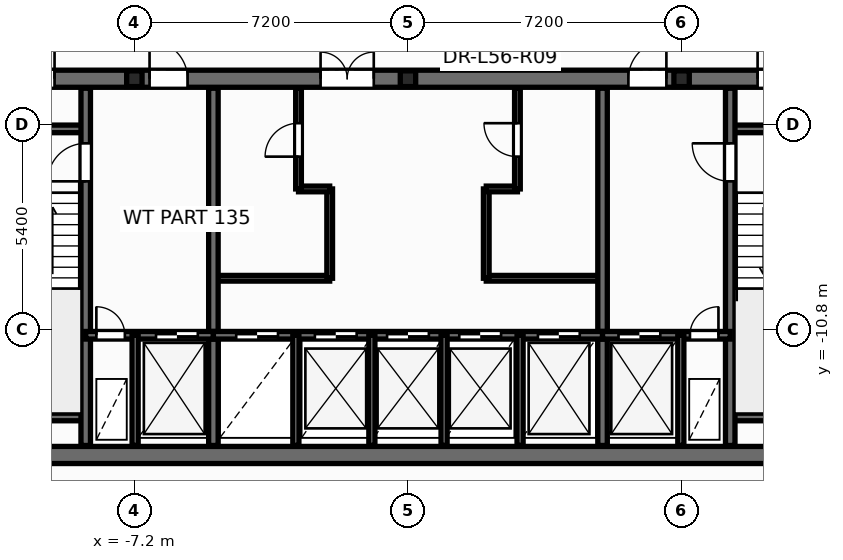
"""IFC4 building model, lengths in metres.
Left out: names, types, materials, properties, quantities, classifications, styles, units other than length and angle.
Written with IfcOpenShell. Run it as: python <this file> out.ifc"""

import sys

from ifc_helpers import new_model, si_unit, direction, frame, frame_2d, origin, origin_2d, place, context, subcontext, project, spatial, rectangle, i_section, extrude, element, fill, save


model = new_model("IFC4")
c1 = context("Model", 3, precision=1e-05, world=origin(), true_north=direction((0.0, 1.0)))
c2 = subcontext(c1, "Body", "Model", "MODEL_VIEW")
j1 = project(units=[si_unit("LENGTHUNIT", "METRE"), si_unit("PLANEANGLEUNIT", "RADIAN")], contexts=[c1])
p1 = place(None, origin())
s1 = spatial("IfcSite", under=j1, at=p1, CompositionType="ELEMENT")
p2 = place(p1, origin())
s2 = spatial("IfcBuilding", under=s1, at=p2, CompositionType="ELEMENT")
p3 = place(p2, frame((0.0, 0.0, 214.5)))
s3 = spatial("IfcBuildingStorey", under=s2, at=p3, CompositionType="ELEMENT", Elevation=214.5)
for number, where, z_axis, x_axis in (
    (1, (-7.2, -4.2, 0.0), (0.0, 0.0, 1.0), (1.0, 0.0, 0.0)),
    (2, (0.0, -4.2, 0.0), (0.0, 0.0, 1.0), (1.0, 0.0, 0.0)),
    (3, (7.2, -4.2, 0.0), (0.0, 0.0, 1.0), (1.0, 0.0, 0.0)),
):
    element("IfcColumn", number, at=place(p3, frame(where, z_axis=z_axis, x_axis=x_axis)), inside=s3, PredefinedType="PILASTER", context=c2, shape_type="SweptSolid", body=[
        extrude(i_section(OverallWidth=0.405, OverallDepth=0.414, WebThickness=0.022, FlangeThickness=0.032, at=origin_2d()), origin(), (0.0, 0.0, 1.0), 3.6),
    ])
p4 = place(p3, frame((-5.12, -9.45, 0.0), z_axis=(0.0, 0.0, 1.0), x_axis=(1.0, 0.0, 0.0)))
e4 = element("IfcWall", 4, at=p4, inside=s3, PredefinedType="PARTITIONING", context=c2, shape_type="SweptSolid", body=[
    extrude(rectangle(XDim=3.06, YDim=0.15, at=frame_2d((1.53, 0.0))), origin(), (0.0, 0.0, 1.0), 3.345),
])
p5 = place(p3, frame((-2.06, -9.45, 0.0), z_axis=(0.0, 0.0, 1.0), x_axis=(0.0, 1.0, 0.0)))
e5 = element("IfcWall", 5, at=p5, inside=s3, PredefinedType="PARTITIONING", context=c2, shape_type="SweptSolid", body=[
    extrude(rectangle(XDim=2.35, YDim=0.15, at=frame_2d((1.175, 0.0))), origin(), (0.0, 0.0, 1.0), 3.345),
])
p6 = place(p3, frame((-2.88, -7.1, 0.0), z_axis=(0.0, 0.0, 1.0), x_axis=(1.0, 0.0, 0.0)))
e6 = element("IfcWall", 6, at=p6, inside=s3, PredefinedType="PARTITIONING", context=c2, shape_type="SweptSolid", body=[
    extrude(rectangle(XDim=0.82, YDim=0.15, at=frame_2d((0.41, 0.0))), origin(), (0.0, 0.0, 1.0), 3.345),
])
p7 = place(p3, frame((-2.88, -7.1, 0.0), z_axis=(0.0, 0.0, 1.0), x_axis=(0.0, 1.0, 0.0)))
e7 = element("IfcWall", 7, at=p7, inside=s3, PredefinedType="PARTITIONING", context=c2, shape_type="SweptSolid", body=[
    extrude(rectangle(XDim=2.65, YDim=0.15, at=frame_2d((1.325, 0.0))), origin(), (0.0, 0.0, 1.0), 3.345),
])
p8 = place(p7, frame((0.85, 0.0, 0.0)))
e8 = element("IfcOpeningElement", 8, at=p8, cuts=e7, PredefinedType="OPENING", context=c2, shape_type="SweptSolid", body=[
    extrude(rectangle(XDim=0.886, YDim=2.104, at=frame_2d((0.44, 1.052))), frame((0.0, 0.085, 0.0), z_axis=(0.0, -1.0, 0.0), x_axis=(1.0, 0.0, 0.0)), (0.0, 0.0, 1.0), 0.17),
])
p9 = place(p3, frame((2.06, -9.45, 0.0), z_axis=(0.0, 0.0, 1.0), x_axis=(1.0, 0.0, 0.0)))
e9 = element("IfcWall", 9, at=p9, inside=s3, PredefinedType="PARTITIONING", context=c2, shape_type="SweptSolid", body=[
    extrude(rectangle(XDim=3.06, YDim=0.15, at=frame_2d((1.53, 0.0))), origin(), (0.0, 0.0, 1.0), 3.345),
])
p10 = place(p3, frame((2.06, -9.45, 0.0), z_axis=(0.0, 0.0, 1.0), x_axis=(0.0, 1.0, 0.0)))
e10 = element("IfcWall", 10, at=p10, inside=s3, PredefinedType="PARTITIONING", context=c2, shape_type="SweptSolid", body=[
    extrude(rectangle(XDim=2.35, YDim=0.15, at=frame_2d((1.175, 0.0))), origin(), (0.0, 0.0, 1.0), 3.345),
])
p11 = place(p3, frame((2.06, -7.1, 0.0), z_axis=(0.0, 0.0, 1.0), x_axis=(1.0, 0.0, 0.0)))
e11 = element("IfcWall", 11, at=p11, inside=s3, PredefinedType="PARTITIONING", context=c2, shape_type="SweptSolid", body=[
    extrude(rectangle(XDim=0.82, YDim=0.15, at=frame_2d((0.41, 0.0))), origin(), (0.0, 0.0, 1.0), 3.345),
])
p12 = place(p3, frame((2.88, -7.1, 0.0), z_axis=(0.0, 0.0, 1.0), x_axis=(0.0, 1.0, 0.0)))
e12 = element("IfcWall", 12, at=p12, inside=s3, PredefinedType="PARTITIONING", context=c2, shape_type="SweptSolid", body=[
    extrude(rectangle(XDim=2.65, YDim=0.15, at=frame_2d((1.325, 0.0))), origin(), (0.0, 0.0, 1.0), 3.345),
])
p13 = place(p12, frame((0.85, 0.0, 0.0)))
e13 = element("IfcOpeningElement", 13, at=p13, cuts=e12, PredefinedType="OPENING", context=c2, shape_type="SweptSolid", body=[
    extrude(rectangle(XDim=0.886, YDim=2.104, at=frame_2d((0.44, 1.052))), frame((0.0, 0.085, 0.0), z_axis=(0.0, -1.0, 0.0), x_axis=(1.0, 0.0, 0.0)), (0.0, 0.0, 1.0), 0.17),
])
p14 = place(p3, frame((-12.65, -14.1, 0.0), z_axis=(0.0, 0.0, 1.0), x_axis=(1.0, 0.0, 0.0)))
e14 = element("IfcWall", 14, at=p14, inside=s3, PredefinedType="SHEAR", context=c2, shape_type="SweptSolid", body=[
    extrude(rectangle(XDim=25.3, YDim=0.45, at=frame_2d((12.65, 0.0))), origin(), (0.0, 0.0, 1.0), 3.6),
])
p15 = place(p3, frame((-12.65, -4.2, 0.0), z_axis=(0.0, 0.0, 1.0), x_axis=(1.0, 0.0, 0.0)))
e15 = element("IfcWall", 15, at=p15, inside=s3, PredefinedType="SHEAR", context=c2, shape_type="SweptSolid", body=[
    extrude(rectangle(XDim=25.3, YDim=0.45, at=frame_2d((12.65, 0.0))), origin(), (0.0, 0.0, 1.0), 3.6),
])
p16 = place(p15, frame((0.95, 0.0, 0.0)))
e16 = element("IfcOpeningElement", 16, at=p16, cuts=e15, PredefinedType="OPENING", context=c2, shape_type="SweptSolid", body=[
    extrude(rectangle(XDim=0.756, YDim=2.054, at=frame_2d((0.375, 1.027))), frame((0.0, 0.235, 0.0), z_axis=(0.0, -1.0, 0.0), x_axis=(1.0, 0.0, 0.0)), (0.0, 0.0, 1.0), 0.47),
])
p17 = place(p15, frame((2.6, 0.0, 0.0)))
e17 = element("IfcOpeningElement", 17, at=p17, cuts=e15, PredefinedType="OPENING", context=c2, shape_type="SweptSolid", body=[
    extrude(rectangle(XDim=0.756, YDim=2.054, at=frame_2d((0.375, 1.027))), frame((0.0, 0.235, 0.0), z_axis=(0.0, -1.0, 0.0), x_axis=(1.0, 0.0, 0.0)), (0.0, 0.0, 1.0), 0.47),
])
p18 = place(p15, frame((21.85, 0.0, 0.0)))
e18 = element("IfcOpeningElement", 18, at=p18, cuts=e15, PredefinedType="OPENING", context=c2, shape_type="SweptSolid", body=[
    extrude(rectangle(XDim=0.756, YDim=2.054, at=frame_2d((0.375, 1.027))), frame((0.0, 0.235, 0.0), z_axis=(0.0, -1.0, 0.0), x_axis=(1.0, 0.0, 0.0)), (0.0, 0.0, 1.0), 0.47),
])
p19 = place(p15, frame((23.5, 0.0, 0.0)))
e19 = element("IfcOpeningElement", 19, at=p19, cuts=e15, PredefinedType="OPENING", context=c2, shape_type="SweptSolid", body=[
    extrude(rectangle(XDim=0.756, YDim=2.054, at=frame_2d((0.375, 1.027))), frame((0.0, 0.235, 0.0), z_axis=(0.0, -1.0, 0.0), x_axis=(1.0, 0.0, 0.0)), (0.0, 0.0, 1.0), 0.47),
])
p20 = place(p15, frame((5.85, 0.0, 0.0)))
e20 = element("IfcOpeningElement", 20, at=p20, cuts=e15, PredefinedType="OPENING", context=c2, shape_type="SweptSolid", body=[
    extrude(rectangle(XDim=1.006, YDim=2.104, at=frame_2d((0.5, 1.052))), frame((0.0, 0.235, 0.0), z_axis=(0.0, -1.0, 0.0), x_axis=(1.0, 0.0, 0.0)), (0.0, 0.0, 1.0), 0.47),
])
p21 = place(p15, frame((10.35, 0.0, 0.0)))
e21 = element("IfcOpeningElement", 21, at=p21, cuts=e15, PredefinedType="OPENING", context=c2, shape_type="SweptSolid", body=[
    extrude(rectangle(XDim=1.406, YDim=2.154, at=frame_2d((0.7, 1.077))), frame((0.0, 0.235, 0.0), z_axis=(0.0, -1.0, 0.0), x_axis=(1.0, 0.0, 0.0)), (0.0, 0.0, 1.0), 0.47),
])
p22 = place(p15, frame((18.45, 0.0, 0.0)))
e22 = element("IfcOpeningElement", 22, at=p22, cuts=e15, PredefinedType="OPENING", context=c2, shape_type="SweptSolid", body=[
    extrude(rectangle(XDim=1.006, YDim=2.104, at=frame_2d((0.5, 1.052))), frame((0.0, 0.235, 0.0), z_axis=(0.0, -1.0, 0.0), x_axis=(1.0, 0.0, 0.0)), (0.0, 0.0, 1.0), 0.47),
])
for number, where, z_axis, x_axis in (
    (23, (-12.35, -5.52, 0.0), (0.0, 0.0, 1.0), (1.0, 0.0, 0.0)),
    (24, (-12.35, -13.1, 0.0), (0.0, 0.0, 1.0), (1.0, 0.0, 0.0)),
    (25, (8.48, -5.52, 0.0), (0.0, 0.0, 1.0), (1.0, 0.0, 0.0)),
    (26, (8.48, -13.1, 0.0), (0.0, 0.0, 1.0), (1.0, 0.0, 0.0)),
):
    element("IfcWall", number, at=place(p3, frame(where, z_axis=z_axis, x_axis=x_axis)), inside=s3, PredefinedType="SOLIDWALL", context=c2, shape_type="SweptSolid", body=[
        extrude(rectangle(XDim=3.87, YDim=0.2, at=frame_2d((1.935, 0.0))), origin(), (0.0, 0.0, 1.0), 3.6),
    ])
p23 = place(p3, frame((-8.48, -13.85, 0.0), z_axis=(0.0, 0.0, 1.0), x_axis=(0.0, 1.0, 0.0)))
e27 = element("IfcWall", 27, at=p23, inside=s3, PredefinedType="SHEAR", context=c2, shape_type="SweptSolid", body=[
    extrude(rectangle(XDim=9.4, YDim=0.25, at=frame_2d((4.7, 0.0))), origin(), (0.0, 0.0, 1.0), 3.6),
])
p24 = place(p23, frame((6.95, 0.0, 0.0)))
e28 = element("IfcOpeningElement", 28, at=p24, cuts=e27, PredefinedType="OPENING", context=c2, shape_type="SweptSolid", body=[
    extrude(rectangle(XDim=1.006, YDim=2.104, at=frame_2d((0.5, 1.052))), frame((0.0, 0.135, 0.0), z_axis=(0.0, -1.0, 0.0), x_axis=(1.0, 0.0, 0.0)), (0.0, 0.0, 1.0), 0.27),
])
p25 = place(p3, frame((8.48, -13.85, 0.0), z_axis=(0.0, 0.0, 1.0), x_axis=(0.0, 1.0, 0.0)))
e29 = element("IfcWall", 29, at=p25, inside=s3, PredefinedType="SHEAR", context=c2, shape_type="SweptSolid", body=[
    extrude(rectangle(XDim=9.4, YDim=0.25, at=frame_2d((4.7, 0.0))), origin(), (0.0, 0.0, 1.0), 3.6),
])
p26 = place(p25, frame((6.95, 0.0, 0.0)))
e30 = element("IfcOpeningElement", 30, at=p26, cuts=e29, PredefinedType="OPENING", context=c2, shape_type="SweptSolid", body=[
    extrude(rectangle(XDim=1.006, YDim=2.104, at=frame_2d((0.5, 1.052))), frame((0.0, 0.135, 0.0), z_axis=(0.0, -1.0, 0.0), x_axis=(1.0, 0.0, 0.0)), (0.0, 0.0, 1.0), 0.27),
])
for number, where, z_axis, x_axis in (
    (31, (-5.12, -13.85, 0.0), (0.0, 0.0, 1.0), (0.0, 1.0, 0.0)),
    (32, (5.12, -13.85, 0.0), (0.0, 0.0, 1.0), (0.0, 1.0, 0.0)),
):
    element("IfcWall", number, at=place(p3, frame(where, z_axis=z_axis, x_axis=x_axis)), inside=s3, PredefinedType="SHEAR", context=c2, shape_type="SweptSolid", body=[
        extrude(rectangle(XDim=9.4, YDim=0.25, at=frame_2d((4.7, 0.0))), origin(), (0.0, 0.0, 1.0), 3.6),
    ])
p27 = place(p3, frame((-8.48, -10.95, 0.0), z_axis=(0.0, 0.0, 1.0), x_axis=(1.0, 0.0, 0.0)))
e33 = element("IfcWall", 33, at=p27, inside=s3, PredefinedType="SOLIDWALL", context=c2, shape_type="SweptSolid", body=[
    extrude(rectangle(XDim=3.36, YDim=0.2, at=frame_2d((1.68, 0.0))), origin(), (0.0, 0.0, 1.0), 3.6),
])
p28 = place(p27, frame((0.28, 0.0, 0.0)))
e34 = element("IfcOpeningElement", 34, at=p28, cuts=e33, PredefinedType="OPENING", context=c2, shape_type="SweptSolid", body=[
    extrude(rectangle(XDim=0.756, YDim=2.054, at=frame_2d((0.375, 1.027))), frame((0.0, 0.11, 0.0), z_axis=(0.0, -1.0, 0.0), x_axis=(1.0, 0.0, 0.0)), (0.0, 0.0, 1.0), 0.22),
])
p29 = place(p27, frame((1.85, 0.0, 0.0)))
e35 = element("IfcOpeningElement", 35, at=p29, cuts=e33, PredefinedType="OPENING", context=c2, shape_type="SweptSolid", body=[
    extrude(rectangle(XDim=1.106, YDim=2.104, at=frame_2d((0.55, 1.052))), frame((0.0, 0.11, 0.0), z_axis=(0.0, -1.0, 0.0), x_axis=(1.0, 0.0, 0.0)), (0.0, 0.0, 1.0), 0.22),
])
p30 = place(p3, frame((-5.12, -10.95, 0.0), z_axis=(0.0, 0.0, 1.0), x_axis=(1.0, 0.0, 0.0)))
e36 = element("IfcWall", 36, at=p30, inside=s3, PredefinedType="SOLIDWALL", context=c2, shape_type="SweptSolid", body=[
    extrude(rectangle(XDim=10.24, YDim=0.2, at=frame_2d((5.12, 0.0))), origin(), (0.0, 0.0, 1.0), 3.6),
])
p31 = place(p30, frame((0.6, 0.0, 0.0)))
e37 = element("IfcOpeningElement", 37, at=p31, cuts=e36, PredefinedType="OPENING", context=c2, shape_type="SweptSolid", body=[
    extrude(rectangle(XDim=1.106, YDim=2.104, at=frame_2d((0.55, 1.052))), frame((0.0, 0.11, 0.0), z_axis=(0.0, -1.0, 0.0), x_axis=(1.0, 0.0, 0.0)), (0.0, 0.0, 1.0), 0.22),
])
p32 = place(p30, frame((2.67, 0.0, 0.0)))
e38 = element("IfcOpeningElement", 38, at=p32, cuts=e36, PredefinedType="OPENING", context=c2, shape_type="SweptSolid", body=[
    extrude(rectangle(XDim=1.106, YDim=2.104, at=frame_2d((0.55, 1.052))), frame((0.0, 0.11, 0.0), z_axis=(0.0, -1.0, 0.0), x_axis=(1.0, 0.0, 0.0)), (0.0, 0.0, 1.0), 0.22),
])
p33 = place(p30, frame((4.57, 0.0, 0.0)))
e39 = element("IfcOpeningElement", 39, at=p33, cuts=e36, PredefinedType="OPENING", context=c2, shape_type="SweptSolid", body=[
    extrude(rectangle(XDim=1.106, YDim=2.104, at=frame_2d((0.55, 1.052))), frame((0.0, 0.11, 0.0), z_axis=(0.0, -1.0, 0.0), x_axis=(1.0, 0.0, 0.0)), (0.0, 0.0, 1.0), 0.22),
])
p34 = place(p30, frame((6.47, 0.0, 0.0)))
e40 = element("IfcOpeningElement", 40, at=p34, cuts=e36, PredefinedType="OPENING", context=c2, shape_type="SweptSolid", body=[
    extrude(rectangle(XDim=1.106, YDim=2.104, at=frame_2d((0.55, 1.052))), frame((0.0, 0.11, 0.0), z_axis=(0.0, -1.0, 0.0), x_axis=(1.0, 0.0, 0.0)), (0.0, 0.0, 1.0), 0.22),
])
p35 = place(p30, frame((8.54, 0.0, 0.0)))
e41 = element("IfcOpeningElement", 41, at=p35, cuts=e36, PredefinedType="OPENING", context=c2, shape_type="SweptSolid", body=[
    extrude(rectangle(XDim=1.106, YDim=2.104, at=frame_2d((0.55, 1.052))), frame((0.0, 0.11, 0.0), z_axis=(0.0, -1.0, 0.0), x_axis=(1.0, 0.0, 0.0)), (0.0, 0.0, 1.0), 0.22),
])
p36 = place(p3, frame((5.12, -10.95, 0.0), z_axis=(0.0, 0.0, 1.0), x_axis=(1.0, 0.0, 0.0)))
e42 = element("IfcWall", 42, at=p36, inside=s3, PredefinedType="SOLIDWALL", context=c2, shape_type="SweptSolid", body=[
    extrude(rectangle(XDim=3.36, YDim=0.2, at=frame_2d((1.68, 0.0))), origin(), (0.0, 0.0, 1.0), 3.6),
])
p37 = place(p36, frame((0.42, 0.0, 0.0)))
e43 = element("IfcOpeningElement", 43, at=p37, cuts=e42, PredefinedType="OPENING", context=c2, shape_type="SweptSolid", body=[
    extrude(rectangle(XDim=1.106, YDim=2.104, at=frame_2d((0.55, 1.052))), frame((0.0, 0.11, 0.0), z_axis=(0.0, -1.0, 0.0), x_axis=(1.0, 0.0, 0.0)), (0.0, 0.0, 1.0), 0.22),
])
p38 = place(p36, frame((2.3, 0.0, 0.0)))
e44 = element("IfcOpeningElement", 44, at=p38, cuts=e42, PredefinedType="OPENING", context=c2, shape_type="SweptSolid", body=[
    extrude(rectangle(XDim=0.756, YDim=2.054, at=frame_2d((0.375, 1.027))), frame((0.0, 0.11, 0.0), z_axis=(0.0, -1.0, 0.0), x_axis=(1.0, 0.0, 0.0)), (0.0, 0.0, 1.0), 0.22),
])
for number, where, z_axis, x_axis in (
    (45, (-7.18, -13.85, 0.0), (0.0, 0.0, 1.0), (0.0, 1.0, 0.0)),
    (46, (7.18, -13.85, 0.0), (0.0, 0.0, 1.0), (0.0, 1.0, 0.0)),
    (47, (-2.95, -13.85, 0.0), (0.0, 0.0, 1.0), (0.0, 1.0, 0.0)),
    (48, (2.95, -13.85, 0.0), (0.0, 0.0, 1.0), (0.0, 1.0, 0.0)),
    (49, (-0.95, -13.85, 0.0), (0.0, 0.0, 1.0), (0.0, 1.0, 0.0)),
    (50, (0.95, -13.85, 0.0), (0.0, 0.0, 1.0), (0.0, 1.0, 0.0)),
):
    element("IfcWall", number, at=place(p3, frame(where, z_axis=z_axis, x_axis=x_axis)), inside=s3, PredefinedType="PARTITIONING", context=c2, shape_type="SweptSolid", body=[
        extrude(rectangle(XDim=2.9, YDim=0.16, at=frame_2d((1.45, 0.0))), origin(), (0.0, 0.0, 1.0), 2.47),
    ])
p39 = place(p8, origin())
e51 = element("IfcDoor", 51, at=p39, inside=s3, OperationType="SINGLE_SWING_LEFT", PredefinedType="DOOR", context=c2, shape_type="SweptSolid", body=[
    extrude(rectangle(XDim=0.88, YDim=2.1, at=frame_2d((0.44, 1.05))), frame((0.0, 0.025, 0.0), z_axis=(0.0, -1.0, 0.0), x_axis=(1.0, 0.0, 0.0)), (0.0, 0.0, 1.0), 0.05),
])
fill(e8, e51)
p40 = place(p13, origin())
e52 = element("IfcDoor", 52, at=p40, inside=s3, OperationType="SINGLE_SWING_RIGHT", PredefinedType="DOOR", context=c2, shape_type="SweptSolid", body=[
    extrude(rectangle(XDim=0.88, YDim=2.1, at=frame_2d((0.44, 1.05))), frame((0.0, 0.025, 0.0), z_axis=(0.0, -1.0, 0.0), x_axis=(1.0, 0.0, 0.0)), (0.0, 0.0, 1.0), 0.05),
])
fill(e13, e52)
p41 = place(p24, origin())
e53 = element("IfcDoor", 53, at=p41, inside=s3, OperationType="SINGLE_SWING_LEFT", PredefinedType="DOOR", context=c2, shape_type="SweptSolid", body=[
    extrude(rectangle(XDim=1.0, YDim=2.1, at=frame_2d((0.5, 1.05))), frame((0.0, 0.025, 0.0), z_axis=(0.0, -1.0, 0.0), x_axis=(1.0, 0.0, 0.0)), (0.0, 0.0, 1.0), 0.05),
])
fill(e28, e53)
p42 = place(p26, origin())
e54 = element("IfcDoor", 54, at=p42, inside=s3, OperationType="SINGLE_SWING_RIGHT", PredefinedType="DOOR", context=c2, shape_type="SweptSolid", body=[
    extrude(rectangle(XDim=1.0, YDim=2.1, at=frame_2d((0.5, 1.05))), frame((0.0, 0.025, 0.0), z_axis=(0.0, -1.0, 0.0), x_axis=(1.0, 0.0, 0.0)), (0.0, 0.0, 1.0), 0.05),
])
fill(e30, e54)
p43 = place(p28, origin())
e55 = element("IfcDoor", 55, at=p43, inside=s3, OperationType="SINGLE_SWING_LEFT", PredefinedType="DOOR", context=c2, shape_type="SweptSolid", body=[
    extrude(rectangle(XDim=0.75, YDim=2.05, at=frame_2d((0.375, 1.025))), frame((0.0, 0.025, 0.0), z_axis=(0.0, -1.0, 0.0), x_axis=(1.0, 0.0, 0.0)), (0.0, 0.0, 1.0), 0.05),
])
fill(e34, e55)
p44 = place(p29, origin())
e56 = element("IfcDoor", 56, at=p44, inside=s3, OperationType="DOUBLE_DOOR_SLIDING", PredefinedType="DOOR", context=c2, shape_type="SweptSolid", body=[
    extrude(rectangle(XDim=1.1, YDim=2.1, at=frame_2d((0.55, 1.05))), frame((0.0, 0.025, 0.0), z_axis=(0.0, -1.0, 0.0), x_axis=(1.0, 0.0, 0.0)), (0.0, 0.0, 1.0), 0.05),
])
fill(e35, e56)
p45 = place(p37, origin())
e57 = element("IfcDoor", 57, at=p45, inside=s3, OperationType="DOUBLE_DOOR_SLIDING", PredefinedType="DOOR", context=c2, shape_type="SweptSolid", body=[
    extrude(rectangle(XDim=1.1, YDim=2.1, at=frame_2d((0.55, 1.05))), frame((0.0, 0.025, 0.0), z_axis=(0.0, -1.0, 0.0), x_axis=(1.0, 0.0, 0.0)), (0.0, 0.0, 1.0), 0.05),
])
fill(e43, e57)
p46 = place(p38, origin())
e58 = element("IfcDoor", 58, at=p46, inside=s3, OperationType="SINGLE_SWING_RIGHT", PredefinedType="DOOR", context=c2, shape_type="SweptSolid", body=[
    extrude(rectangle(XDim=0.75, YDim=2.05, at=frame_2d((0.375, 1.025))), frame((0.0, 0.025, 0.0), z_axis=(0.0, -1.0, 0.0), x_axis=(1.0, 0.0, 0.0)), (0.0, 0.0, 1.0), 0.05),
])
fill(e44, e58)
p47 = place(p31, origin())
e59 = element("IfcDoor", 59, at=p47, inside=s3, OperationType="DOUBLE_DOOR_SLIDING", PredefinedType="DOOR", context=c2, shape_type="SweptSolid", body=[
    extrude(rectangle(XDim=1.1, YDim=2.1, at=frame_2d((0.55, 1.05))), frame((0.0, 0.025, 0.0), z_axis=(0.0, -1.0, 0.0), x_axis=(1.0, 0.0, 0.0)), (0.0, 0.0, 1.0), 0.05),
])
fill(e37, e59)
p48 = place(p32, origin())
e60 = element("IfcDoor", 60, at=p48, inside=s3, OperationType="DOUBLE_DOOR_SLIDING", PredefinedType="DOOR", context=c2, shape_type="SweptSolid", body=[
    extrude(rectangle(XDim=1.1, YDim=2.1, at=frame_2d((0.55, 1.05))), frame((0.0, 0.025, 0.0), z_axis=(0.0, -1.0, 0.0), x_axis=(1.0, 0.0, 0.0)), (0.0, 0.0, 1.0), 0.05),
])
fill(e38, e60)
p49 = place(p33, origin())
e61 = element("IfcDoor", 61, at=p49, inside=s3, OperationType="DOUBLE_DOOR_SLIDING", PredefinedType="DOOR", context=c2, shape_type="SweptSolid", body=[
    extrude(rectangle(XDim=1.1, YDim=2.1, at=frame_2d((0.55, 1.05))), frame((0.0, 0.025, 0.0), z_axis=(0.0, -1.0, 0.0), x_axis=(1.0, 0.0, 0.0)), (0.0, 0.0, 1.0), 0.05),
])
fill(e39, e61)
p50 = place(p34, origin())
e62 = element("IfcDoor", 62, at=p50, inside=s3, OperationType="DOUBLE_DOOR_SLIDING", PredefinedType="DOOR", context=c2, shape_type="SweptSolid", body=[
    extrude(rectangle(XDim=1.1, YDim=2.1, at=frame_2d((0.55, 1.05))), frame((0.0, 0.025, 0.0), z_axis=(0.0, -1.0, 0.0), x_axis=(1.0, 0.0, 0.0)), (0.0, 0.0, 1.0), 0.05),
])
fill(e40, e62)
p51 = place(p35, origin())
e63 = element("IfcDoor", 63, at=p51, inside=s3, OperationType="DOUBLE_DOOR_SLIDING", PredefinedType="DOOR", context=c2, shape_type="SweptSolid", body=[
    extrude(rectangle(XDim=1.1, YDim=2.1, at=frame_2d((0.55, 1.05))), frame((0.0, 0.025, 0.0), z_axis=(0.0, -1.0, 0.0), x_axis=(1.0, 0.0, 0.0)), (0.0, 0.0, 1.0), 0.05),
])
fill(e41, e63)
p52 = place(p17, origin())
e64 = element("IfcDoor", 64, at=p52, inside=s3, OperationType="SINGLE_SWING_RIGHT", PredefinedType="DOOR", context=c2, shape_type="SweptSolid", body=[
    extrude(rectangle(XDim=0.75, YDim=2.05, at=frame_2d((0.375, 1.025))), frame((0.0, 0.025, 0.0), z_axis=(0.0, -1.0, 0.0), x_axis=(1.0, 0.0, 0.0)), (0.0, 0.0, 1.0), 0.05),
])
fill(e17, e64)
p53 = place(p18, origin())
e65 = element("IfcDoor", 65, at=p53, inside=s3, OperationType="SINGLE_SWING_LEFT", PredefinedType="DOOR", context=c2, shape_type="SweptSolid", body=[
    extrude(rectangle(XDim=0.75, YDim=2.05, at=frame_2d((0.375, 1.025))), frame((0.0, 0.025, 0.0), z_axis=(0.0, -1.0, 0.0), x_axis=(1.0, 0.0, 0.0)), (0.0, 0.0, 1.0), 0.05),
])
fill(e18, e65)
p54 = place(p20, origin())
e66 = element("IfcDoor", 66, at=p54, inside=s3, OperationType="SINGLE_SWING_LEFT", PredefinedType="DOOR", context=c2, shape_type="SweptSolid", body=[
    extrude(rectangle(XDim=1.0, YDim=2.1, at=frame_2d((0.5, 1.05))), frame((0.0, 0.025, 0.0), z_axis=(0.0, -1.0, 0.0), x_axis=(1.0, 0.0, 0.0)), (0.0, 0.0, 1.0), 0.05),
])
fill(e20, e66)
p55 = place(p21, origin())
e67 = element("IfcDoor", 67, at=p55, inside=s3, OperationType="DOUBLE_DOOR_SINGLE_SWING", PredefinedType="DOOR", context=c2, shape_type="SweptSolid", body=[
    extrude(rectangle(XDim=1.4, YDim=2.15, at=frame_2d((0.7, 1.075))), frame((0.0, 0.025, 0.0), z_axis=(0.0, -1.0, 0.0), x_axis=(1.0, 0.0, 0.0)), (0.0, 0.0, 1.0), 0.05),
])
fill(e21, e67)
p56 = place(p22, origin())
e68 = element("IfcDoor", 68, at=p56, inside=s3, OperationType="SINGLE_SWING_RIGHT", PredefinedType="DOOR", context=c2, shape_type="SweptSolid", body=[
    extrude(rectangle(XDim=1.0, YDim=2.1, at=frame_2d((0.5, 1.05))), frame((0.0, 0.025, 0.0), z_axis=(0.0, -1.0, 0.0), x_axis=(1.0, 0.0, 0.0)), (0.0, 0.0, 1.0), 0.05),
])
fill(e22, e68)
save(model, sys.argv[1])
